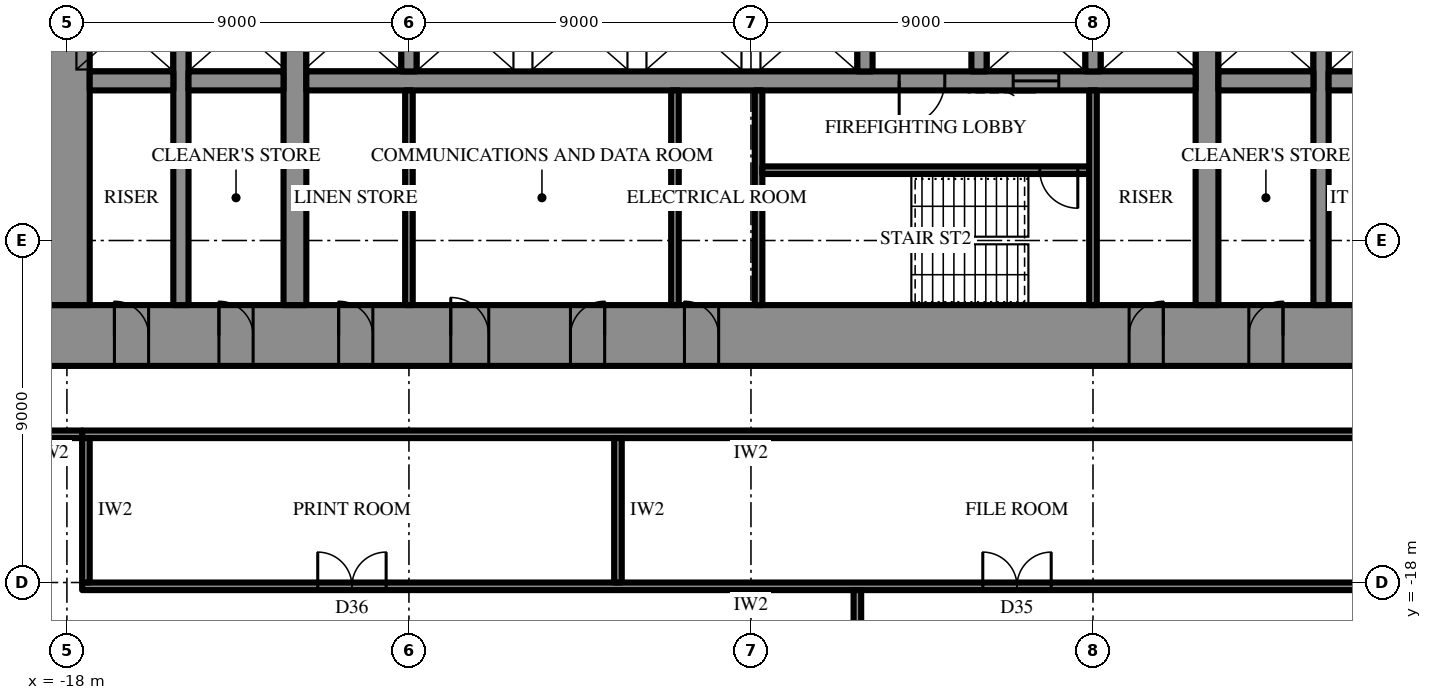
"""IFC4 building model, lengths in metres.
Left out: names, types, materials, properties, quantities, classifications, styles, units other than length and angle.
Written with IfcOpenShell. Run it as: python <this file> out.ifc"""

import sys

from ifc_helpers import new_model, si_unit, direction, frame, frame_2d, origin, place, context, subcontext, project, spatial, rectangle, extrude, element, fill, save


model = new_model("IFC4")
c1 = context("Model", 3, precision=1e-05, world=origin(), true_north=direction((0.0, 1.0)))
c2 = subcontext(c1, "Body", "Model", "MODEL_VIEW")
j1 = project(units=[si_unit("LENGTHUNIT", "METRE"), si_unit("PLANEANGLEUNIT", "RADIAN")], contexts=[c1])
p1 = place(None, origin())
s1 = spatial("IfcSite", under=j1, at=p1, CompositionType="ELEMENT")
p2 = place(p1, origin())
s2 = spatial("IfcBuilding", under=s1, at=p2, CompositionType="ELEMENT")
p3 = place(p2, frame((0.0, 0.0, 82.3)))
s3 = spatial("IfcBuildingStorey", under=s2, at=p3, CompositionType="ELEMENT", Elevation=82.3)
p4 = place(p3, frame((18.6, -11.5, 0.0), z_axis=(0.0, 0.0, 1.0), x_axis=(-1.0, 0.0, 0.0)))
e1 = element("IfcWall", 1, at=p4, inside=s3, PredefinedType="SHEAR", context=c2, shape_type="SweptSolid", body=[
    extrude(rectangle(XDim=37.2, YDim=1.6, at=frame_2d((18.6, 0.0))), origin(), (0.0, 0.0, 1.0), 4.2),
])
p5 = place(p4, frame((19.45, 0.0, 0.0)))
e2 = element("IfcOpeningElement", 2, at=p5, cuts=e1, PredefinedType="OPENING", context=c2, shape_type="SweptSolid", body=[
    extrude(rectangle(XDim=0.9, YDim=2.2, at=frame_2d((0.45, 1.1))), frame((0.0, 0.81, 0.0), z_axis=(0.0, -1.0, 0.0), x_axis=(1.0, 0.0, 0.0)), (0.0, 0.0, 1.0), 1.62),
])
p6 = place(p4, frame((22.45, 0.0, 0.0)))
e3 = element("IfcOpeningElement", 3, at=p6, cuts=e1, PredefinedType="OPENING", context=c2, shape_type="SweptSolid", body=[
    extrude(rectangle(XDim=0.9, YDim=2.2, at=frame_2d((0.45, 1.1))), frame((0.0, 0.81, 0.0), z_axis=(0.0, -1.0, 0.0), x_axis=(1.0, 0.0, 0.0)), (0.0, 0.0, 1.0), 1.62),
])
p7 = place(p4, frame((25.5, 0.0, 0.0)))
e4 = element("IfcOpeningElement", 4, at=p7, cuts=e1, PredefinedType="OPENING", context=c2, shape_type="SweptSolid", body=[
    extrude(rectangle(XDim=1.0, YDim=2.2, at=frame_2d((0.5, 1.1))), frame((0.0, 0.81, 0.0), z_axis=(0.0, -1.0, 0.0), x_axis=(1.0, 0.0, 0.0)), (0.0, 0.0, 1.0), 1.62),
])
p8 = place(p4, frame((1.85, 0.0, 0.0)))
e5 = element("IfcOpeningElement", 5, at=p8, cuts=e1, PredefinedType="OPENING", context=c2, shape_type="SweptSolid", body=[
    extrude(rectangle(XDim=0.9, YDim=2.2, at=frame_2d((0.45, 1.1))), frame((0.0, 0.81, 0.0), z_axis=(0.0, -1.0, 0.0), x_axis=(1.0, 0.0, 0.0)), (0.0, 0.0, 1.0), 1.62),
])
p9 = place(p4, frame((4.6, 0.0, 0.0)))
e6 = element("IfcOpeningElement", 6, at=p9, cuts=e1, PredefinedType="OPENING", context=c2, shape_type="SweptSolid", body=[
    extrude(rectangle(XDim=0.9, YDim=2.2, at=frame_2d((0.45, 1.1))), frame((0.0, 0.81, 0.0), z_axis=(0.0, -1.0, 0.0), x_axis=(1.0, 0.0, 0.0)), (0.0, 0.0, 1.0), 1.62),
])
p10 = place(p4, frame((7.75, 0.0, 0.0)))
e7 = element("IfcOpeningElement", 7, at=p10, cuts=e1, PredefinedType="OPENING", context=c2, shape_type="SweptSolid", body=[
    extrude(rectangle(XDim=0.9, YDim=2.2, at=frame_2d((0.45, 1.1))), frame((0.0, 0.81, 0.0), z_axis=(0.0, -1.0, 0.0), x_axis=(1.0, 0.0, 0.0)), (0.0, 0.0, 1.0), 1.62),
])
p11 = place(p4, frame((28.55, 0.0, 0.0)))
e8 = element("IfcOpeningElement", 8, at=p11, cuts=e1, PredefinedType="OPENING", context=c2, shape_type="SweptSolid", body=[
    extrude(rectangle(XDim=0.9, YDim=2.2, at=frame_2d((0.45, 1.1))), frame((0.0, 0.81, 0.0), z_axis=(0.0, -1.0, 0.0), x_axis=(1.0, 0.0, 0.0)), (0.0, 0.0, 1.0), 1.62),
])
p12 = place(p4, frame((31.7, 0.0, 0.0)))
e9 = element("IfcOpeningElement", 9, at=p12, cuts=e1, PredefinedType="OPENING", context=c2, shape_type="SweptSolid", body=[
    extrude(rectangle(XDim=0.9, YDim=2.2, at=frame_2d((0.45, 1.1))), frame((0.0, 0.81, 0.0), z_axis=(0.0, -1.0, 0.0), x_axis=(1.0, 0.0, 0.0)), (0.0, 0.0, 1.0), 1.62),
])
p13 = place(p4, frame((34.45, 0.0, 0.0)))
e10 = element("IfcOpeningElement", 10, at=p13, cuts=e1, PredefinedType="OPENING", context=c2, shape_type="SweptSolid", body=[
    extrude(rectangle(XDim=0.9, YDim=2.2, at=frame_2d((0.45, 1.1))), frame((0.0, 0.81, 0.0), z_axis=(0.0, -1.0, 0.0), x_axis=(1.0, 0.0, 0.0)), (0.0, 0.0, 1.0), 1.62),
])
p14 = place(p3, frame((-18.0, 10.7, 0.0), z_axis=(0.0, 0.0, 1.0), x_axis=(0.0, -1.0, 0.0)))
e11 = element("IfcWall", 11, at=p14, inside=s3, PredefinedType="SHEAR", context=c2, shape_type="SweptSolid", body=[
    extrude(rectangle(XDim=21.4, YDim=1.2, at=frame_2d((10.7, 0.0))), origin(), (0.0, 0.0, 1.0), 4.2),
])
p15 = place(p14, frame((9.8, 0.0, 0.0)))
e12 = element("IfcOpeningElement", 12, at=p15, cuts=e11, PredefinedType="OPENING", context=c2, shape_type="SweptSolid", body=[
    extrude(rectangle(XDim=1.8, YDim=2.4, at=frame_2d((0.9, 1.2))), frame((0.0, 0.61, 0.0), z_axis=(0.0, -1.0, 0.0), x_axis=(1.0, 0.0, 0.0)), (0.0, 0.0, 1.0), 1.22),
])
p16 = place(p3, frame((12.0, -10.7, 0.0), z_axis=(0.0, 0.0, 1.0), x_axis=(0.0, 1.0, 0.0)))
e13 = element("IfcWall", 13, at=p16, inside=s3, PredefinedType="SHEAR", context=c2, shape_type="SweptSolid", body=[
    extrude(rectangle(XDim=21.4, YDim=0.6, at=frame_2d((10.7, 0.0))), origin(), (0.0, 0.0, 1.0), 4.2),
])
p17 = place(p16, frame((9.8, 0.0, 0.0)))
e14 = element("IfcOpeningElement", 14, at=p17, cuts=e13, PredefinedType="OPENING", context=c2, shape_type="SweptSolid", body=[
    extrude(rectangle(XDim=1.8, YDim=2.4, at=frame_2d((0.9, 1.2))), frame((0.0, 0.31, 0.0), z_axis=(0.0, -1.0, 0.0), x_axis=(1.0, 0.0, 0.0)), (0.0, 0.0, 1.0), 0.62),
])
p18 = place(p3, frame((-12.0, -10.7, 0.0), z_axis=(0.0, 0.0, 1.0), x_axis=(0.0, 1.0, 0.0)))
e15 = element("IfcWall", 15, at=p18, inside=s3, PredefinedType="SHEAR", context=c2, shape_type="SweptSolid", body=[
    extrude(rectangle(XDim=21.4, YDim=0.6, at=frame_2d((10.7, 0.0))), origin(), (0.0, 0.0, 1.0), 4.2),
])
p19 = place(p18, frame((9.8, 0.0, 0.0)))
e16 = element("IfcOpeningElement", 16, at=p19, cuts=e15, PredefinedType="OPENING", context=c2, shape_type="SweptSolid", body=[
    extrude(rectangle(XDim=1.8, YDim=2.4, at=frame_2d((0.9, 1.2))), frame((0.0, 0.31, 0.0), z_axis=(0.0, -1.0, 0.0), x_axis=(1.0, 0.0, 0.0)), (0.0, 0.0, 1.0), 0.62),
])
p20 = place(p3, frame((15.0, -10.7, 0.0), z_axis=(0.0, 0.0, 1.0), x_axis=(0.0, 1.0, 0.0)))
e17 = element("IfcWall", 17, at=p20, inside=s3, PredefinedType="SHEAR", context=c2, shape_type="SweptSolid", body=[
    extrude(rectangle(XDim=21.4, YDim=0.4, at=frame_2d((10.7, 0.0))), origin(), (0.0, 0.0, 1.0), 4.2),
])
p21 = place(p20, frame((9.8, 0.0, 0.0)))
e18 = element("IfcOpeningElement", 18, at=p21, cuts=e17, PredefinedType="OPENING", context=c2, shape_type="SweptSolid", body=[
    extrude(rectangle(XDim=1.8, YDim=2.4, at=frame_2d((0.9, 1.2))), frame((0.0, 0.21, 0.0), z_axis=(0.0, -1.0, 0.0), x_axis=(1.0, 0.0, 0.0)), (0.0, 0.0, 1.0), 0.42),
])
p22 = place(p3, frame((-15.0, -10.7, 0.0), z_axis=(0.0, 0.0, 1.0), x_axis=(0.0, 1.0, 0.0)))
e19 = element("IfcWall", 19, at=p22, inside=s3, PredefinedType="SHEAR", context=c2, shape_type="SweptSolid", body=[
    extrude(rectangle(XDim=21.4, YDim=0.4, at=frame_2d((10.7, 0.0))), origin(), (0.0, 0.0, 1.0), 4.2),
])
p23 = place(p22, frame((9.8, 0.0, 0.0)))
e20 = element("IfcOpeningElement", 20, at=p23, cuts=e19, PredefinedType="OPENING", context=c2, shape_type="SweptSolid", body=[
    extrude(rectangle(XDim=1.8, YDim=2.4, at=frame_2d((0.9, 1.2))), frame((0.0, 0.21, 0.0), z_axis=(0.0, -1.0, 0.0), x_axis=(1.0, 0.0, 0.0)), (0.0, 0.0, 1.0), 0.42),
])
p24 = place(p3, frame((17.4, -4.8, 0.0), z_axis=(0.0, 0.0, 1.0), x_axis=(-1.0, 0.0, 0.0)))
e21 = element("IfcWall", 21, at=p24, inside=s3, PredefinedType="SHEAR", context=c2, shape_type="SweptSolid", body=[
    extrude(rectangle(XDim=2.2, YDim=0.5, at=frame_2d((1.1, 0.0))), origin(), (0.0, 0.0, 1.0), 4.2),
])
p25 = place(p3, frame((14.8, -4.8, 0.0), z_axis=(0.0, 0.0, 1.0), x_axis=(-1.0, 0.0, 0.0)))
e22 = element("IfcWall", 22, at=p25, inside=s3, PredefinedType="SHEAR", context=c2, shape_type="SweptSolid", body=[
    extrude(rectangle(XDim=2.5, YDim=0.5, at=frame_2d((1.25, 0.0))), origin(), (0.0, 0.0, 1.0), 4.2),
])
p26 = place(p3, frame((11.7, -4.8, 0.0), z_axis=(0.0, 0.0, 1.0), x_axis=(-1.0, 0.0, 0.0)))
e23 = element("IfcWall", 23, at=p26, inside=s3, PredefinedType="SHEAR", context=c2, shape_type="SweptSolid", body=[
    extrude(rectangle(XDim=23.4, YDim=0.5, at=frame_2d((11.7, 0.0))), origin(), (0.0, 0.0, 1.0), 4.2),
])
p27 = place(p26, frame((6.6, 0.0, 0.0)))
e24 = element("IfcOpeningElement", 24, at=p27, cuts=e23, PredefinedType="OPENING", context=c2, shape_type="SweptSolid", body=[
    extrude(rectangle(XDim=1.2, YDim=2.2, at=frame_2d((0.6, 1.1))), frame((0.0, 0.26, 0.0), z_axis=(0.0, -1.0, 0.0), x_axis=(1.0, 0.0, 0.0)), (0.0, 0.0, 1.0), 0.52),
])
p28 = place(p26, frame((3.6, 0.0, 0.0)))
e25 = element("IfcOpeningElement", 25, at=p28, cuts=e23, PredefinedType="OPENING", context=c2, shape_type="SweptSolid", body=[
    extrude(rectangle(XDim=1.2, YDim=2.2, at=frame_2d((0.6, 1.1))), frame((0.0, 0.26, 0.0), z_axis=(0.0, -1.0, 0.0), x_axis=(1.0, 0.0, 0.0)), (0.0, 0.0, 1.0), 0.52),
])
p29 = place(p3, frame((-12.3, -4.8, 0.0), z_axis=(0.0, 0.0, 1.0), x_axis=(-1.0, 0.0, 0.0)))
e26 = element("IfcWall", 26, at=p29, inside=s3, PredefinedType="SHEAR", context=c2, shape_type="SweptSolid", body=[
    extrude(rectangle(XDim=2.5, YDim=0.5, at=frame_2d((1.25, 0.0))), origin(), (0.0, 0.0, 1.0), 4.2),
])
p30 = place(p3, frame((-15.2, -4.8, 0.0), z_axis=(0.0, 0.0, 1.0), x_axis=(-1.0, 0.0, 0.0)))
e27 = element("IfcWall", 27, at=p30, inside=s3, PredefinedType="SHEAR", context=c2, shape_type="SweptSolid", body=[
    extrude(rectangle(XDim=2.2, YDim=0.5, at=frame_2d((1.1, 0.0))), origin(), (0.0, 0.0, 1.0), 4.2),
])
for number, where, z_axis, x_axis in (
    (28, (9.0, -2.25, 0.0), (0.0, 0.0, 1.0), (0.0, -1.0, 0.0)),
    (29, (6.0, -2.25, 0.0), (0.0, 0.0, 1.0), (0.0, -1.0, 0.0)),
    (30, (3.0, -2.25, 0.0), (0.0, 0.0, 1.0), (0.0, -1.0, 0.0)),
    (31, (-9.0, -2.25, 0.0), (0.0, 0.0, 1.0), (0.0, -1.0, 0.0)),
):
    element("IfcWall", number, at=place(p3, frame(where, z_axis=z_axis, x_axis=x_axis)), inside=s3, PredefinedType="SHEAR", context=c2, shape_type="SweptSolid", body=[
        extrude(rectangle(XDim=2.3, YDim=0.4, at=frame_2d((1.15, 0.0))), origin(), (0.0, 0.0, 1.0), 4.2),
    ])
p31 = place(p3, frame((0.2, -5.05, 0.0), z_axis=(0.0, 0.0, 1.0), x_axis=(0.0, -1.0, 0.0)))
e32 = element("IfcWall", 32, at=p31, inside=s3, PredefinedType="SHEAR", context=c2, shape_type="SweptSolid", body=[
    extrude(rectangle(XDim=5.65, YDim=0.2, at=frame_2d((2.825, 0.0))), origin(), (0.0, 0.0, 1.0), 4.2),
])
p32 = place(p3, frame((8.9, -7.15, 0.0), z_axis=(0.0, 0.0, 1.0), x_axis=(-1.0, 0.0, 0.0)))
e33 = element("IfcWall", 33, at=p32, inside=s3, PredefinedType="SHEAR", context=c2, shape_type="SweptSolid", body=[
    extrude(rectangle(XDim=8.6, YDim=0.2, at=frame_2d((4.3, 0.0))), origin(), (0.0, 0.0, 1.0), 4.2),
])
p33 = place(p32, frame((0.3, 0.0, 0.0)))
e34 = element("IfcOpeningElement", 34, at=p33, cuts=e33, PredefinedType="OPENING", context=c2, shape_type="SweptSolid", body=[
    extrude(rectangle(XDim=1.0, YDim=2.2, at=frame_2d((0.5, 1.1))), frame((0.0, 0.11, 0.0), z_axis=(0.0, -1.0, 0.0), x_axis=(1.0, 0.0, 0.0)), (0.0, 0.0, 1.0), 0.22),
])
for number, where, z_axis, x_axis in (
    (35, (9.0, -5.05, 0.0), (0.0, 0.0, 1.0), (0.0, -1.0, 0.0)),
    (36, (-9.0, -5.05, 0.0), (0.0, 0.0, 1.0), (0.0, -1.0, 0.0)),
    (37, (-2.0, -5.05, 0.0), (0.0, 0.0, 1.0), (0.0, -1.0, 0.0)),
):
    element("IfcWall", number, at=place(p3, frame(where, z_axis=z_axis, x_axis=x_axis)), inside=s3, PredefinedType="PARTITIONING", context=c2, shape_type="SweptSolid", body=[
        extrude(rectangle(XDim=5.65, YDim=0.2, at=frame_2d((2.825, 0.0))), origin(), (0.0, 0.0, 1.0), 4.0),
    ])
p34 = place(p3, frame((17.6, -14.1, 0.0), z_axis=(0.0, 0.0, 1.0), x_axis=(-1.0, 0.0, 0.0)))
e38 = element("IfcWall", 38, at=p34, inside=s3, PredefinedType="PARTITIONING", context=c2, shape_type="SweptSolid", body=[
    extrude(rectangle(XDim=35.2, YDim=0.2, at=frame_2d((17.6, 0.0))), origin(), (0.0, 0.0, 1.0), 4.0),
])
p35 = place(p3, frame((17.6, -18.1, 0.0), z_axis=(0.0, 0.0, 1.0), x_axis=(-1.0, 0.0, 0.0)))
e39 = element("IfcWall", 39, at=p35, inside=s3, PredefinedType="PARTITIONING", context=c2, shape_type="SweptSolid", body=[
    extrude(rectangle(XDim=35.2, YDim=0.2, at=frame_2d((17.6, 0.0))), origin(), (0.0, 0.0, 1.0), 4.0),
])
p36 = place(p35, frame((9.7, 0.0, 0.0)))
e40 = element("IfcOpeningElement", 40, at=p36, cuts=e39, PredefinedType="OPENING", context=c2, shape_type="SweptSolid", body=[
    extrude(rectangle(XDim=1.8, YDim=2.4, at=frame_2d((0.9, 1.2))), frame((0.0, 0.11, 0.0), z_axis=(0.0, -1.0, 0.0), x_axis=(1.0, 0.0, 0.0)), (0.0, 0.0, 1.0), 0.22),
])
p37 = place(p35, frame((27.2, 0.0, 0.0)))
e41 = element("IfcOpeningElement", 41, at=p37, cuts=e39, PredefinedType="OPENING", context=c2, shape_type="SweptSolid", body=[
    extrude(rectangle(XDim=1.8, YDim=2.4, at=frame_2d((0.9, 1.2))), frame((0.0, 0.11, 0.0), z_axis=(0.0, -1.0, 0.0), x_axis=(1.0, 0.0, 0.0)), (0.0, 0.0, 1.0), 0.22),
])
for number, where, z_axis, x_axis in (
    (42, (-3.5, -14.2, 0.0), (0.0, 0.0, 1.0), (0.0, -1.0, 0.0)),
    (43, (-17.5, -14.2, 0.0), (0.0, 0.0, 1.0), (0.0, -1.0, 0.0)),
):
    element("IfcWall", number, at=place(p3, frame(where, z_axis=z_axis, x_axis=x_axis)), inside=s3, PredefinedType="PARTITIONING", context=c2, shape_type="SweptSolid", body=[
        extrude(rectangle(XDim=3.8, YDim=0.2, at=frame_2d((1.9, 0.0))), origin(), (0.0, 0.0, 1.0), 4.0),
    ])
p38 = place(p3, frame((-17.6, -14.1, 0.0), z_axis=(0.0, 0.0, 1.0), x_axis=(-1.0, 0.0, 0.0)))
e44 = element("IfcWall", 44, at=p38, inside=s3, PredefinedType="PARTITIONING", context=c2, shape_type="SweptSolid", body=[
    extrude(rectangle(XDim=1.6, YDim=0.2, at=frame_2d((0.8, 0.0))), origin(), (0.0, 0.0, 1.0), 4.0),
])
p39 = place(p3, frame((2.8, -18.2, 0.0), z_axis=(0.0, 0.0, 1.0), x_axis=(0.0, -1.0, 0.0)))
e45 = element("IfcWall", 45, at=p39, inside=s3, PredefinedType="PARTITIONING", context=c2, shape_type="SweptSolid", body=[
    extrude(rectangle(XDim=15.6, YDim=0.2, at=frame_2d((7.8, 0.0))), origin(), (0.0, 0.0, 1.0), 2.944),
])
p40 = place(p39, frame((1.06, 0.0, 0.0)))
e46 = element("IfcOpeningElement", 46, at=p40, cuts=e45, PredefinedType="OPENING", context=c2, shape_type="SweptSolid", body=[
    extrude(rectangle(XDim=1.0, YDim=2.2, at=frame_2d((0.5, 1.1))), frame((0.0, 0.11, 0.0), z_axis=(0.0, -1.0, 0.0), x_axis=(1.0, 0.0, 0.0)), (0.0, 0.0, 1.0), 0.22),
])
p41 = place(p27, origin())
e47 = element("IfcDoor", 47, at=p41, inside=s3, OperationType="SINGLE_SWING_LEFT", PredefinedType="DOOR", context=c2, shape_type="SweptSolid", body=[
    extrude(rectangle(XDim=1.2, YDim=2.2, at=frame_2d((0.6, 1.1))), frame((0.0, 0.025, 0.0), z_axis=(0.0, -1.0, 0.0), x_axis=(1.0, 0.0, 0.0)), (0.0, 0.0, 1.0), 0.05),
])
fill(e24, e47)
p42 = place(p33, origin())
e48 = element("IfcDoor", 48, at=p42, inside=s3, OperationType="SINGLE_SWING_RIGHT", PredefinedType="DOOR", context=c2, shape_type="SweptSolid", body=[
    extrude(rectangle(XDim=1.0, YDim=2.2, at=frame_2d((0.5, 1.1))), frame((0.0, 0.025, 0.0), z_axis=(0.0, -1.0, 0.0), x_axis=(1.0, 0.0, 0.0)), (0.0, 0.0, 1.0), 0.05),
])
fill(e34, e48)
p43 = place(p5, frame((0.9, 0.0, 0.0), z_axis=(0.0, 0.0, 1.0), x_axis=(-1.0, 0.0, 0.0)))
e49 = element("IfcDoor", 49, at=p43, inside=s3, OperationType="SINGLE_SWING_RIGHT", PredefinedType="DOOR", context=c2, shape_type="SweptSolid", body=[
    extrude(rectangle(XDim=0.9, YDim=2.2, at=frame_2d((0.45, 1.1))), frame((0.0, 0.025, 0.0), z_axis=(0.0, -1.0, 0.0), x_axis=(1.0, 0.0, 0.0)), (0.0, 0.0, 1.0), 0.05),
])
fill(e2, e49)
p44 = place(p6, frame((0.9, 0.0, 0.0), z_axis=(0.0, 0.0, 1.0), x_axis=(-1.0, 0.0, 0.0)))
e50 = element("IfcDoor", 50, at=p44, inside=s3, OperationType="SINGLE_SWING_LEFT", PredefinedType="DOOR", context=c2, shape_type="SweptSolid", body=[
    extrude(rectangle(XDim=0.9, YDim=2.2, at=frame_2d((0.45, 1.1))), frame((0.0, 0.025, 0.0), z_axis=(0.0, -1.0, 0.0), x_axis=(1.0, 0.0, 0.0)), (0.0, 0.0, 1.0), 0.05),
])
fill(e3, e50)
p45 = place(p7, frame((1.0, 0.0, 0.0), z_axis=(0.0, 0.0, 1.0), x_axis=(-1.0, 0.0, 0.0)))
e51 = element("IfcDoor", 51, at=p45, inside=s3, OperationType="SINGLE_SWING_RIGHT", PredefinedType="DOOR", context=c2, shape_type="SweptSolid", body=[
    extrude(rectangle(XDim=1.0, YDim=2.2, at=frame_2d((0.5, 1.1))), frame((0.0, 0.025, 0.0), z_axis=(0.0, -1.0, 0.0), x_axis=(1.0, 0.0, 0.0)), (0.0, 0.0, 1.0), 0.05),
])
fill(e4, e51)
p46 = place(p9, frame((0.9, 0.0, 0.0), z_axis=(0.0, 0.0, 1.0), x_axis=(-1.0, 0.0, 0.0)))
e52 = element("IfcDoor", 52, at=p46, inside=s3, OperationType="SINGLE_SWING_LEFT", PredefinedType="DOOR", context=c2, shape_type="SweptSolid", body=[
    extrude(rectangle(XDim=0.9, YDim=2.2, at=frame_2d((0.45, 1.1))), frame((0.0, 0.025, 0.0), z_axis=(0.0, -1.0, 0.0), x_axis=(1.0, 0.0, 0.0)), (0.0, 0.0, 1.0), 0.05),
])
fill(e6, e52)
p47 = place(p10, frame((0.9, 0.0, 0.0), z_axis=(0.0, 0.0, 1.0), x_axis=(-1.0, 0.0, 0.0)))
e53 = element("IfcDoor", 53, at=p47, inside=s3, OperationType="SINGLE_SWING_LEFT", PredefinedType="DOOR", context=c2, shape_type="SweptSolid", body=[
    extrude(rectangle(XDim=0.9, YDim=2.2, at=frame_2d((0.45, 1.1))), frame((0.0, 0.025, 0.0), z_axis=(0.0, -1.0, 0.0), x_axis=(1.0, 0.0, 0.0)), (0.0, 0.0, 1.0), 0.05),
])
fill(e7, e53)
p48 = place(p11, frame((0.9, 0.0, 0.0), z_axis=(0.0, 0.0, 1.0), x_axis=(-1.0, 0.0, 0.0)))
e54 = element("IfcDoor", 54, at=p48, inside=s3, OperationType="SINGLE_SWING_RIGHT", PredefinedType="DOOR", context=c2, shape_type="SweptSolid", body=[
    extrude(rectangle(XDim=0.9, YDim=2.2, at=frame_2d((0.45, 1.1))), frame((0.0, 0.025, 0.0), z_axis=(0.0, -1.0, 0.0), x_axis=(1.0, 0.0, 0.0)), (0.0, 0.0, 1.0), 0.05),
])
fill(e8, e54)
p49 = place(p12, frame((0.9, 0.0, 0.0), z_axis=(0.0, 0.0, 1.0), x_axis=(-1.0, 0.0, 0.0)))
e55 = element("IfcDoor", 55, at=p49, inside=s3, OperationType="SINGLE_SWING_RIGHT", PredefinedType="DOOR", context=c2, shape_type="SweptSolid", body=[
    extrude(rectangle(XDim=0.9, YDim=2.2, at=frame_2d((0.45, 1.1))), frame((0.0, 0.025, 0.0), z_axis=(0.0, -1.0, 0.0), x_axis=(1.0, 0.0, 0.0)), (0.0, 0.0, 1.0), 0.05),
])
fill(e9, e55)
p50 = place(p13, frame((0.9, 0.0, 0.0), z_axis=(0.0, 0.0, 1.0), x_axis=(-1.0, 0.0, 0.0)))
e56 = element("IfcDoor", 56, at=p50, inside=s3, OperationType="SINGLE_SWING_RIGHT", PredefinedType="DOOR", context=c2, shape_type="SweptSolid", body=[
    extrude(rectangle(XDim=0.9, YDim=2.2, at=frame_2d((0.45, 1.1))), frame((0.0, 0.025, 0.0), z_axis=(0.0, -1.0, 0.0), x_axis=(1.0, 0.0, 0.0)), (0.0, 0.0, 1.0), 0.05),
])
fill(e10, e56)
p51 = place(p28, origin())
e57 = element("IfcDoor", 57, at=p51, inside=s3, OperationType="SLIDING_TO_LEFT", PredefinedType="DOOR", context=c2, shape_type="SweptSolid", body=[
    extrude(rectangle(XDim=1.2, YDim=2.2, at=frame_2d((0.6, 1.1))), frame((0.0, 0.025, 0.0), z_axis=(0.0, -1.0, 0.0), x_axis=(1.0, 0.0, 0.0)), (0.0, 0.0, 1.0), 0.05),
])
fill(e25, e57)
p52 = place(p36, frame((1.8, 0.0, 0.0), z_axis=(0.0, 0.0, 1.0), x_axis=(-1.0, 0.0, 0.0)))
e58 = element("IfcDoor", 58, at=p52, inside=s3, OperationType="DOUBLE_DOOR_SINGLE_SWING", PredefinedType="DOOR", context=c2, shape_type="SweptSolid", body=[
    extrude(rectangle(XDim=1.8, YDim=2.4, at=frame_2d((0.9, 1.2))), frame((0.0, 0.025, 0.0), z_axis=(0.0, -1.0, 0.0), x_axis=(1.0, 0.0, 0.0)), (0.0, 0.0, 1.0), 0.05),
])
fill(e40, e58)
p53 = place(p37, frame((1.8, 0.0, 0.0), z_axis=(0.0, 0.0, 1.0), x_axis=(-1.0, 0.0, 0.0)))
e59 = element("IfcDoor", 59, at=p53, inside=s3, OperationType="DOUBLE_DOOR_SINGLE_SWING", PredefinedType="DOOR", context=c2, shape_type="SweptSolid", body=[
    extrude(rectangle(XDim=1.8, YDim=2.4, at=frame_2d((0.9, 1.2))), frame((0.0, 0.025, 0.0), z_axis=(0.0, -1.0, 0.0), x_axis=(1.0, 0.0, 0.0)), (0.0, 0.0, 1.0), 0.05),
])
fill(e41, e59)
save(model, sys.argv[1])
